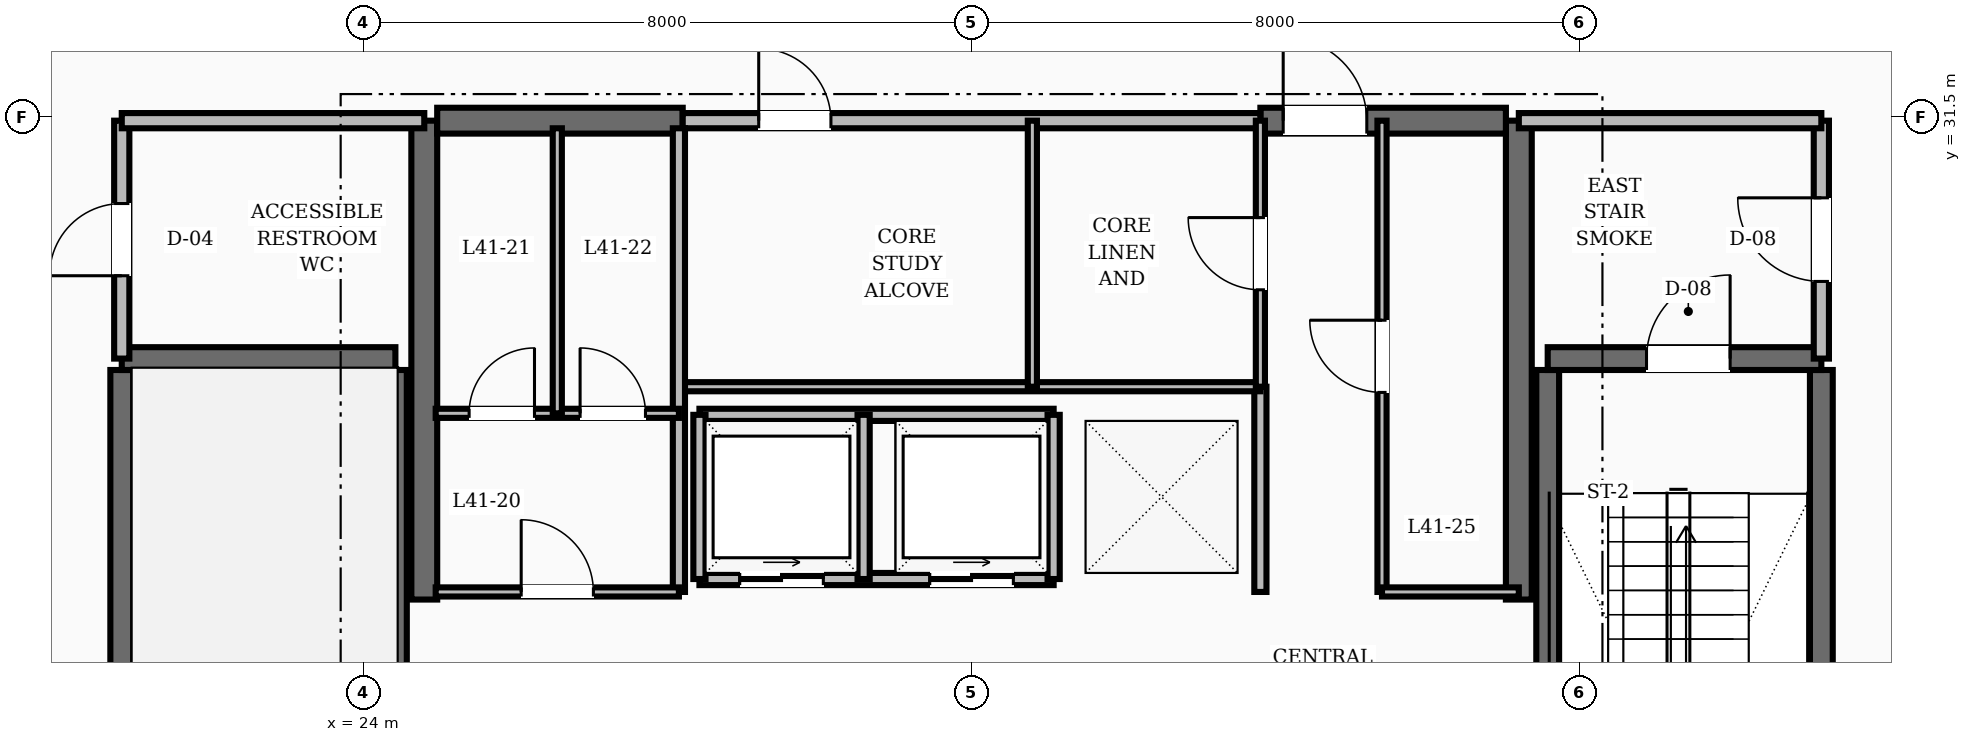
"""IFC4 building model, lengths in metres.
Left out: names, types, materials, properties, quantities, classifications, styles, units other than length and angle.
Written with IfcOpenShell. Run it as: python <this file> out.ifc"""

import sys

from ifc_helpers import new_model, si_unit, direction, frame, frame_2d, origin, place, context, subcontext, project, spatial, rectangle, extrude, element, fill, save


model = new_model("IFC4")
c1 = context("Model", 3, precision=1e-05, world=origin(), true_north=direction((0.0, 1.0)))
c2 = subcontext(c1, "Body", "Model", "MODEL_VIEW")
j1 = project(units=[si_unit("LENGTHUNIT", "METRE"), si_unit("PLANEANGLEUNIT", "RADIAN")], contexts=[c1])
p1 = place(None, origin())
s1 = spatial("IfcSite", under=j1, at=p1, CompositionType="ELEMENT")
p2 = place(p1, origin())
s2 = spatial("IfcBuilding", under=s1, at=p2, CompositionType="ELEMENT")
p3 = place(p2, frame((0.0, 0.0, 160.4)))
s3 = spatial("IfcBuildingStorey", under=s2, at=p3, CompositionType="ELEMENT", Elevation=160.4)
for number, where, z_axis, x_axis in (
    (1, (24.8, 25.15, 0.0), (0.0, 0.0, 1.0), (0.0, 1.0, 0.0)),
    (2, (39.2, 25.15, 0.0), (0.0, 0.0, 1.0), (0.0, 1.0, 0.0)),
):
    element("IfcWall", number, at=place(p3, frame(where, z_axis=z_axis, x_axis=x_axis)), inside=s3, PredefinedType="SHEAR", context=c2, shape_type="SweptSolid", body=[
        extrude(rectangle(XDim=6.3, YDim=0.34, at=frame_2d((3.15, 0.0))), origin(), (0.0, 0.0, 1.0), 3.6),
    ])
p4 = place(p3, frame((24.97, 31.45, 0.0), z_axis=(0.0, 0.0, 1.0), x_axis=(1.0, 0.0, 0.0)))
e3 = element("IfcWall", 3, at=p4, inside=s3, PredefinedType="SHEAR", context=c2, shape_type="SweptSolid", body=[
    extrude(rectangle(XDim=3.23, YDim=0.34, at=frame_2d((1.615, 0.0))), origin(), (0.0, 0.0, 1.0), 3.6),
])
p5 = place(p3, frame((35.8, 31.45, 0.0), z_axis=(0.0, 0.0, 1.0), x_axis=(1.0, 0.0, 0.0)))
e4 = element("IfcWall", 4, at=p5, inside=s3, PredefinedType="SHEAR", context=c2, shape_type="SweptSolid", body=[
    extrude(rectangle(XDim=3.23, YDim=0.34, at=frame_2d((1.615, 0.0))), origin(), (0.0, 0.0, 1.0), 3.6),
])
p6 = place(p5, frame((0.3, 0.0, 0.0)))
e5 = element("IfcOpeningElement", 5, at=p6, cuts=e4, PredefinedType="OPENING", context=c2, shape_type="SweptSolid", body=[
    extrude(rectangle(XDim=1.1, YDim=2.1, at=frame_2d((0.55, 1.05))), frame((0.0, 0.18, 0.0), z_axis=(0.0, -1.0, 0.0), x_axis=(1.0, 0.0, 0.0)), (0.0, 0.0, 1.0), 0.36),
])
for number, where, z_axis, x_axis in (
    (6, (20.82, 19.43, 0.0), (0.0, 0.0, 1.0), (0.0, 1.0, 0.0)),
    (7, (24.42, 19.43, 0.0), (0.0, 0.0, 1.0), (0.0, 1.0, 0.0)),
):
    element("IfcWall", number, at=place(p3, frame(where, z_axis=z_axis, x_axis=x_axis)), inside=s3, PredefinedType="SHEAR", context=c2, shape_type="SweptSolid", body=[
        extrude(rectangle(XDim=8.74, YDim=0.3, at=frame_2d((4.37, 0.0))), origin(), (0.0, 0.0, 1.0), 3.6),
    ])
p7 = place(p3, frame((20.82, 28.32, 0.0), z_axis=(0.0, 0.0, 1.0), x_axis=(1.0, 0.0, 0.0)))
e8 = element("IfcWall", 8, at=p7, inside=s3, PredefinedType="SHEAR", context=c2, shape_type="SweptSolid", body=[
    extrude(rectangle(XDim=3.6, YDim=0.3, at=frame_2d((1.8, 0.0))), origin(), (0.0, 0.0, 1.0), 3.6),
])
for number, where, z_axis, x_axis in (
    (9, (43.18, 19.43, 0.0), (0.0, 0.0, 1.0), (0.0, 1.0, 0.0)),
    (10, (39.58, 19.43, 0.0), (0.0, 0.0, 1.0), (0.0, 1.0, 0.0)),
):
    element("IfcWall", number, at=place(p3, frame(where, z_axis=z_axis, x_axis=x_axis)), inside=s3, PredefinedType="SHEAR", context=c2, shape_type="SweptSolid", body=[
        extrude(rectangle(XDim=8.74, YDim=0.3, at=frame_2d((4.37, 0.0))), origin(), (0.0, 0.0, 1.0), 3.6),
    ])
p8 = place(p3, frame((39.58, 28.32, 0.0), z_axis=(0.0, 0.0, 1.0), x_axis=(1.0, 0.0, 0.0)))
e11 = element("IfcWall", 11, at=p8, inside=s3, PredefinedType="SHEAR", context=c2, shape_type="SweptSolid", body=[
    extrude(rectangle(XDim=3.6, YDim=0.3, at=frame_2d((1.8, 0.0))), origin(), (0.0, 0.0, 1.0), 3.6),
])
p9 = place(p8, frame((1.3, 0.0, 0.0)))
e12 = element("IfcOpeningElement", 12, at=p9, cuts=e11, PredefinedType="OPENING", context=c2, shape_type="SweptSolid", body=[
    extrude(rectangle(XDim=1.1, YDim=2.1, at=frame_2d((0.55, 1.05))), frame((0.0, 0.16, 0.0), z_axis=(0.0, -1.0, 0.0), x_axis=(1.0, 0.0, 0.0)), (0.0, 0.0, 1.0), 0.32),
])
p10 = place(p3, frame((43.18, 28.32, 0.0), z_axis=(0.0, 0.0, 1.0), x_axis=(0.0, 1.0, 0.0)))
e13 = element("IfcWall", 13, at=p10, inside=s3, PredefinedType="SOLIDWALL", context=c2, shape_type="SweptSolid", body=[
    extrude(rectangle(XDim=3.13, YDim=0.2, at=frame_2d((1.565, 0.0))), origin(), (0.0, 0.0, 1.0), 2.8),
])
p11 = place(p10, frame((1.015, 0.0, 0.0)))
e14 = element("IfcOpeningElement", 14, at=p11, cuts=e13, PredefinedType="OPENING", context=c2, shape_type="SweptSolid", body=[
    extrude(rectangle(XDim=1.1, YDim=2.1, at=frame_2d((0.55, 1.05))), frame((0.0, 0.11, 0.0), z_axis=(0.0, -1.0, 0.0), x_axis=(1.0, 0.0, 0.0)), (0.0, 0.0, 1.0), 0.22),
])
p12 = place(p3, frame((39.2, 31.45, 0.0), z_axis=(0.0, 0.0, 1.0), x_axis=(1.0, 0.0, 0.0)))
e15 = element("IfcWall", 15, at=p12, inside=s3, PredefinedType="SOLIDWALL", context=c2, shape_type="SweptSolid", body=[
    extrude(rectangle(XDim=3.98, YDim=0.2, at=frame_2d((1.99, 0.0))), origin(), (0.0, 0.0, 1.0), 2.8),
])
p13 = place(p3, frame((20.82, 28.32, 0.0), z_axis=(0.0, 0.0, 1.0), x_axis=(0.0, 1.0, 0.0)))
e16 = element("IfcWall", 16, at=p13, inside=s3, PredefinedType="SOLIDWALL", context=c2, shape_type="SweptSolid", body=[
    extrude(rectangle(XDim=3.13, YDim=0.2, at=frame_2d((1.565, 0.0))), origin(), (0.0, 0.0, 1.0), 2.8),
])
p14 = place(p13, frame((1.09, 0.0, 0.0)))
e17 = element("IfcOpeningElement", 17, at=p14, cuts=e16, PredefinedType="OPENING", context=c2, shape_type="SweptSolid", body=[
    extrude(rectangle(XDim=0.95, YDim=2.1, at=frame_2d((0.475, 1.05))), frame((0.0, 0.11, 0.0), z_axis=(0.0, -1.0, 0.0), x_axis=(1.0, 0.0, 0.0)), (0.0, 0.0, 1.0), 0.22),
])
p15 = place(p3, frame((20.82, 31.45, 0.0), z_axis=(0.0, 0.0, 1.0), x_axis=(1.0, 0.0, 0.0)))
e18 = element("IfcWall", 18, at=p15, inside=s3, PredefinedType="SOLIDWALL", context=c2, shape_type="SweptSolid", body=[
    extrude(rectangle(XDim=3.98, YDim=0.2, at=frame_2d((1.99, 0.0))), origin(), (0.0, 0.0, 1.0), 2.8),
])
p16 = place(p3, frame((35.8, 25.25, 0.0), z_axis=(0.0, 0.0, 1.0), x_axis=(0.0, 1.0, 0.0)))
e19 = element("IfcWall", 19, at=p16, inside=s3, PredefinedType="SOLIDWALL", context=c2, shape_type="SweptSolid", body=[
    extrude(rectangle(XDim=2.7, YDim=0.16, at=frame_2d((1.35, 0.0))), origin(), (0.0, 0.0, 1.0), 2.8),
])
p17 = place(p3, frame((28.42, 25.42, 0.0), z_axis=(0.0, 0.0, 1.0), x_axis=(1.0, 0.0, 0.0)))
e20 = element("IfcWall", 20, at=p17, inside=s3, PredefinedType="SOLIDWALL", context=c2, shape_type="SweptSolid", body=[
    extrude(rectangle(XDim=4.66, YDim=0.16, at=frame_2d((2.33, 0.0))), origin(), (0.0, 0.0, 1.0), 2.8),
])
p18 = place(p17, frame((0.53, 0.0, 0.0)))
e21 = element("IfcOpeningElement", 21, at=p18, cuts=e20, PredefinedType="OPENING", context=c2, shape_type="SweptSolid", body=[
    extrude(rectangle(XDim=1.1, YDim=2.15, at=frame_2d((0.55, 1.075))), frame((0.0, 0.09, 0.0), z_axis=(0.0, -1.0, 0.0), x_axis=(1.0, 0.0, 0.0)), (0.0, 0.0, 1.0), 0.18),
])
p19 = place(p17, frame((3.03, 0.0, 0.0)))
e22 = element("IfcOpeningElement", 22, at=p19, cuts=e20, PredefinedType="OPENING", context=c2, shape_type="SweptSolid", body=[
    extrude(rectangle(XDim=1.1, YDim=2.15, at=frame_2d((0.55, 1.075))), frame((0.0, 0.09, 0.0), z_axis=(0.0, -1.0, 0.0), x_axis=(1.0, 0.0, 0.0)), (0.0, 0.0, 1.0), 0.18),
])
p20 = place(p3, frame((28.42, 27.58, 0.0), z_axis=(0.0, 0.0, 1.0), x_axis=(1.0, 0.0, 0.0)))
e23 = element("IfcWall", 23, at=p20, inside=s3, PredefinedType="SOLIDWALL", context=c2, shape_type="SweptSolid", body=[
    extrude(rectangle(XDim=4.66, YDim=0.16, at=frame_2d((2.33, 0.0))), origin(), (0.0, 0.0, 1.0), 2.8),
])
for number, where, z_axis, x_axis in (
    (24, (28.42, 25.42, 0.0), (0.0, 0.0, 1.0), (0.0, 1.0, 0.0)),
    (25, (30.58, 25.42, 0.0), (0.0, 0.0, 1.0), (0.0, 1.0, 0.0)),
    (26, (33.08, 25.42, 0.0), (0.0, 0.0, 1.0), (0.0, 1.0, 0.0)),
):
    element("IfcWall", number, at=place(p3, frame(where, z_axis=z_axis, x_axis=x_axis)), inside=s3, PredefinedType="SOLIDWALL", context=c2, shape_type="SweptSolid", body=[
        extrude(rectangle(XDim=2.16, YDim=0.16, at=frame_2d((1.08, 0.0))), origin(), (0.0, 0.0, 1.0), 2.8),
    ])
p21 = place(p3, frame((28.2, 31.45, 0.0), z_axis=(0.0, 0.0, 1.0), x_axis=(1.0, 0.0, 0.0)))
e27 = element("IfcWall", 27, at=p21, inside=s3, PredefinedType="SOLIDWALL", context=c2, shape_type="SweptSolid", body=[
    extrude(rectangle(XDim=7.6, YDim=0.2, at=frame_2d((3.8, 0.0))), origin(), (0.0, 0.0, 1.0), 2.8),
])
p22 = place(p21, frame((1.0, 0.0, 0.0)))
e28 = element("IfcOpeningElement", 28, at=p22, cuts=e27, PredefinedType="OPENING", context=c2, shape_type="SweptSolid", body=[
    extrude(rectangle(XDim=0.95, YDim=2.1, at=frame_2d((0.475, 1.05))), frame((0.0, 0.11, 0.0), z_axis=(0.0, -1.0, 0.0), x_axis=(1.0, 0.0, 0.0)), (0.0, 0.0, 1.0), 0.22),
])
p23 = place(p3, frame((28.2, 27.95, 0.0), z_axis=(0.0, 0.0, 1.0), x_axis=(1.0, 0.0, 0.0)))
e29 = element("IfcWall", 29, at=p23, inside=s3, PredefinedType="PARTITIONING", context=c2, shape_type="SweptSolid", body=[
    extrude(rectangle(XDim=7.6, YDim=0.12, at=frame_2d((3.8, 0.0))), origin(), (0.0, 0.0, 1.0), 2.8),
])
p24 = place(p3, frame((35.8, 27.95, 0.0), z_axis=(0.0, 0.0, 1.0), x_axis=(0.0, 1.0, 0.0)))
e30 = element("IfcWall", 30, at=p24, inside=s3, PredefinedType="PARTITIONING", context=c2, shape_type="SweptSolid", body=[
    extrude(rectangle(XDim=3.5, YDim=0.12, at=frame_2d((1.75, 0.0))), origin(), (0.0, 0.0, 1.0), 2.8),
])
p25 = place(p24, frame((1.275, 0.0, 0.0)))
e31 = element("IfcOpeningElement", 31, at=p25, cuts=e30, PredefinedType="OPENING", context=c2, shape_type="SweptSolid", body=[
    extrude(rectangle(XDim=0.95, YDim=2.1, at=frame_2d((0.475, 1.05))), frame((0.0, 0.07, 0.0), z_axis=(0.0, -1.0, 0.0), x_axis=(1.0, 0.0, 0.0)), (0.0, 0.0, 1.0), 0.14),
])
p26 = place(p3, frame((32.8, 27.95, 0.0), z_axis=(0.0, 0.0, 1.0), x_axis=(0.0, 1.0, 0.0)))
e32 = element("IfcWall", 32, at=p26, inside=s3, PredefinedType="PARTITIONING", context=c2, shape_type="SweptSolid", body=[
    extrude(rectangle(XDim=3.5, YDim=0.12, at=frame_2d((1.75, 0.0))), origin(), (0.0, 0.0, 1.0), 2.8),
])
p27 = place(p3, frame((28.15, 25.25, 0.0), z_axis=(0.0, 0.0, 1.0), x_axis=(0.0, 1.0, 0.0)))
e33 = element("IfcWall", 33, at=p27, inside=s3, PredefinedType="SOLIDWALL", context=c2, shape_type="SweptSolid", body=[
    extrude(rectangle(XDim=6.1, YDim=0.16, at=frame_2d((3.05, 0.0))), origin(), (0.0, 0.0, 1.0), 2.8),
])
p28 = place(p3, frame((24.95, 25.25, 0.0), z_axis=(0.0, 0.0, 1.0), x_axis=(1.0, 0.0, 0.0)))
e34 = element("IfcWall", 34, at=p28, inside=s3, PredefinedType="PARTITIONING", context=c2, shape_type="SweptSolid", body=[
    extrude(rectangle(XDim=3.2, YDim=0.12, at=frame_2d((1.6, 0.0))), origin(), (0.0, 0.0, 1.0), 2.8),
])
p29 = place(p28, frame((1.125, 0.0, 0.0)))
e35 = element("IfcOpeningElement", 35, at=p29, cuts=e34, PredefinedType="OPENING", context=c2, shape_type="SweptSolid", body=[
    extrude(rectangle(XDim=0.95, YDim=2.1, at=frame_2d((0.475, 1.05))), frame((0.0, 0.07, 0.0), z_axis=(0.0, -1.0, 0.0), x_axis=(1.0, 0.0, 0.0)), (0.0, 0.0, 1.0), 0.14),
])
p30 = place(p3, frame((37.4, 25.25, 0.0), z_axis=(0.0, 0.0, 1.0), x_axis=(0.0, 1.0, 0.0)))
e36 = element("IfcWall", 36, at=p30, inside=s3, PredefinedType="PARTITIONING", context=c2, shape_type="SweptSolid", body=[
    extrude(rectangle(XDim=6.2, YDim=0.12, at=frame_2d((3.1, 0.0))), origin(), (0.0, 0.0, 1.0), 2.8),
])
p31 = place(p30, frame((2.625, 0.0, 0.0)))
e37 = element("IfcOpeningElement", 37, at=p31, cuts=e36, PredefinedType="OPENING", context=c2, shape_type="SweptSolid", body=[
    extrude(rectangle(XDim=0.95, YDim=2.1, at=frame_2d((0.475, 1.05))), frame((0.0, 0.07, 0.0), z_axis=(0.0, -1.0, 0.0), x_axis=(1.0, 0.0, 0.0)), (0.0, 0.0, 1.0), 0.14),
])
p32 = place(p3, frame((37.4, 25.25, 0.0), z_axis=(0.0, 0.0, 1.0), x_axis=(1.0, 0.0, 0.0)))
e38 = element("IfcWall", 38, at=p32, inside=s3, PredefinedType="PARTITIONING", context=c2, shape_type="SweptSolid", body=[
    extrude(rectangle(XDim=1.8, YDim=0.12, at=frame_2d((0.9, 0.0))), origin(), (0.0, 0.0, 1.0), 2.8),
])
p33 = place(p3, frame((24.95, 27.6, 0.0), z_axis=(0.0, 0.0, 1.0), x_axis=(1.0, 0.0, 0.0)))
e39 = element("IfcWall", 39, at=p33, inside=s3, PredefinedType="PARTITIONING", context=c2, shape_type="SweptSolid", body=[
    extrude(rectangle(XDim=3.2, YDim=0.12, at=frame_2d((1.6, 0.0))), origin(), (0.0, 0.0, 1.0), 2.8),
])
p34 = place(p33, frame((0.44, 0.0, 0.0)))
e40 = element("IfcOpeningElement", 40, at=p34, cuts=e39, PredefinedType="OPENING", context=c2, shape_type="SweptSolid", body=[
    extrude(rectangle(XDim=0.86, YDim=2.1, at=frame_2d((0.43, 1.05))), frame((0.0, 0.07, 0.0), z_axis=(0.0, -1.0, 0.0), x_axis=(1.0, 0.0, 0.0)), (0.0, 0.0, 1.0), 0.14),
])
p35 = place(p33, frame((1.9, 0.0, 0.0)))
e41 = element("IfcOpeningElement", 41, at=p35, cuts=e39, PredefinedType="OPENING", context=c2, shape_type="SweptSolid", body=[
    extrude(rectangle(XDim=0.86, YDim=2.1, at=frame_2d((0.43, 1.05))), frame((0.0, 0.07, 0.0), z_axis=(0.0, -1.0, 0.0), x_axis=(1.0, 0.0, 0.0)), (0.0, 0.0, 1.0), 0.14),
])
p36 = place(p3, frame((26.55, 27.6, 0.0), z_axis=(0.0, 0.0, 1.0), x_axis=(0.0, 1.0, 0.0)))
e42 = element("IfcWall", 42, at=p36, inside=s3, PredefinedType="PARTITIONING", context=c2, shape_type="SweptSolid", body=[
    extrude(rectangle(XDim=3.75, YDim=0.12, at=frame_2d((1.875, 0.0))), origin(), (0.0, 0.0, 1.0), 2.8),
])
p37 = place(p9, origin())
e43 = element("IfcDoor", 43, at=p37, inside=s3, OperationType="SINGLE_SWING_RIGHT", PredefinedType="DOOR", context=c2, shape_type="SweptSolid", body=[
    extrude(rectangle(XDim=1.1, YDim=2.1, at=frame_2d((0.55, 1.05))), frame((0.0, 0.025, 0.0), z_axis=(0.0, -1.0, 0.0), x_axis=(1.0, 0.0, 0.0)), (0.0, 0.0, 1.0), 0.05),
])
fill(e12, e43)
p38 = place(p11, origin())
e44 = element("IfcDoor", 44, at=p38, inside=s3, OperationType="SINGLE_SWING_RIGHT", PredefinedType="DOOR", context=c2, shape_type="SweptSolid", body=[
    extrude(rectangle(XDim=1.1, YDim=2.1, at=frame_2d((0.55, 1.05))), frame((0.0, 0.025, 0.0), z_axis=(0.0, -1.0, 0.0), x_axis=(1.0, 0.0, 0.0)), (0.0, 0.0, 1.0), 0.05),
])
fill(e14, e44)
p39 = place(p14, origin())
e45 = element("IfcDoor", 45, at=p39, inside=s3, OperationType="SINGLE_SWING_LEFT", PredefinedType="DOOR", context=c2, shape_type="SweptSolid", body=[
    extrude(rectangle(XDim=0.95, YDim=2.1, at=frame_2d((0.475, 1.05))), frame((0.0, 0.025, 0.0), z_axis=(0.0, -1.0, 0.0), x_axis=(1.0, 0.0, 0.0)), (0.0, 0.0, 1.0), 0.05),
])
fill(e17, e45)
p40 = place(p6, origin())
e46 = element("IfcDoor", 46, at=p40, inside=s3, OperationType="SINGLE_SWING_LEFT", PredefinedType="DOOR", context=c2, shape_type="SweptSolid", body=[
    extrude(rectangle(XDim=1.1, YDim=2.1, at=frame_2d((0.55, 1.05))), frame((0.0, 0.025, 0.0), z_axis=(0.0, -1.0, 0.0), x_axis=(1.0, 0.0, 0.0)), (0.0, 0.0, 1.0), 0.05),
])
fill(e5, e46)
p41 = place(p18, origin())
e47 = element("IfcDoor", 47, at=p41, inside=s3, OperationType="SLIDING_TO_RIGHT", PredefinedType="DOOR", context=c2, shape_type="SweptSolid", body=[
    extrude(rectangle(XDim=1.1, YDim=2.15, at=frame_2d((0.55, 1.075))), frame((0.0, 0.025, 0.0), z_axis=(0.0, -1.0, 0.0), x_axis=(1.0, 0.0, 0.0)), (0.0, 0.0, 1.0), 0.05),
])
fill(e21, e47)
p42 = place(p19, origin())
e48 = element("IfcDoor", 48, at=p42, inside=s3, OperationType="SLIDING_TO_RIGHT", PredefinedType="DOOR", context=c2, shape_type="SweptSolid", body=[
    extrude(rectangle(XDim=1.1, YDim=2.15, at=frame_2d((0.55, 1.075))), frame((0.0, 0.025, 0.0), z_axis=(0.0, -1.0, 0.0), x_axis=(1.0, 0.0, 0.0)), (0.0, 0.0, 1.0), 0.05),
])
fill(e22, e48)
p43 = place(p22, origin())
e49 = element("IfcDoor", 49, at=p43, inside=s3, OperationType="SINGLE_SWING_LEFT", PredefinedType="DOOR", context=c2, shape_type="SweptSolid", body=[
    extrude(rectangle(XDim=0.95, YDim=2.1, at=frame_2d((0.475, 1.05))), frame((0.0, 0.025, 0.0), z_axis=(0.0, -1.0, 0.0), x_axis=(1.0, 0.0, 0.0)), (0.0, 0.0, 1.0), 0.05),
])
fill(e28, e49)
p44 = place(p25, origin())
e50 = element("IfcDoor", 50, at=p44, inside=s3, OperationType="SINGLE_SWING_RIGHT", PredefinedType="DOOR", context=c2, shape_type="SweptSolid", body=[
    extrude(rectangle(XDim=0.95, YDim=2.1, at=frame_2d((0.475, 1.05))), frame((0.0, 0.025, 0.0), z_axis=(0.0, -1.0, 0.0), x_axis=(1.0, 0.0, 0.0)), (0.0, 0.0, 1.0), 0.05),
])
fill(e31, e50)
p45 = place(p29, origin())
e51 = element("IfcDoor", 51, at=p45, inside=s3, OperationType="SINGLE_SWING_LEFT", PredefinedType="DOOR", context=c2, shape_type="SweptSolid", body=[
    extrude(rectangle(XDim=0.95, YDim=2.1, at=frame_2d((0.475, 1.05))), frame((0.0, 0.025, 0.0), z_axis=(0.0, -1.0, 0.0), x_axis=(1.0, 0.0, 0.0)), (0.0, 0.0, 1.0), 0.05),
])
fill(e35, e51)
p46 = place(p34, origin())
e52 = element("IfcDoor", 52, at=p46, inside=s3, OperationType="SINGLE_SWING_RIGHT", PredefinedType="DOOR", context=c2, shape_type="SweptSolid", body=[
    extrude(rectangle(XDim=0.86, YDim=2.1, at=frame_2d((0.43, 1.05))), frame((0.0, 0.025, 0.0), z_axis=(0.0, -1.0, 0.0), x_axis=(1.0, 0.0, 0.0)), (0.0, 0.0, 1.0), 0.05),
])
fill(e40, e52)
p47 = place(p35, origin())
e53 = element("IfcDoor", 53, at=p47, inside=s3, OperationType="SINGLE_SWING_LEFT", PredefinedType="DOOR", context=c2, shape_type="SweptSolid", body=[
    extrude(rectangle(XDim=0.86, YDim=2.1, at=frame_2d((0.43, 1.05))), frame((0.0, 0.025, 0.0), z_axis=(0.0, -1.0, 0.0), x_axis=(1.0, 0.0, 0.0)), (0.0, 0.0, 1.0), 0.05),
])
fill(e41, e53)
p48 = place(p31, origin())
e54 = element("IfcDoor", 54, at=p48, inside=s3, OperationType="SINGLE_SWING_RIGHT", PredefinedType="DOOR", context=c2, shape_type="SweptSolid", body=[
    extrude(rectangle(XDim=0.95, YDim=2.1, at=frame_2d((0.475, 1.05))), frame((0.0, 0.025, 0.0), z_axis=(0.0, -1.0, 0.0), x_axis=(1.0, 0.0, 0.0)), (0.0, 0.0, 1.0), 0.05),
])
fill(e37, e54)
save(model, sys.argv[1])
